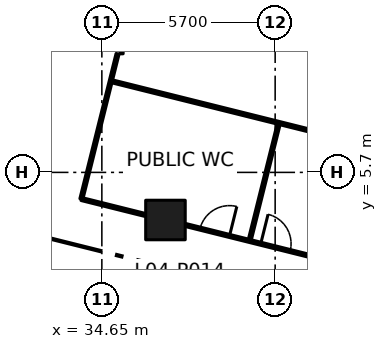
"""IFC4 building model, lengths in metres.
Left out: names, types, materials, properties, quantities, classifications, styles, units other than length and angle.
Written with IfcOpenShell. Run it as: python <this file> out.ifc"""

import sys

from ifc_helpers import new_model, si_unit, direction, frame, frame_2d, origin, origin_2d, place, context, subcontext, project, spatial, rectangle, extrude, element, fill, save


model = new_model("IFC4")
c1 = context("Model", 3, precision=1e-05, world=origin(), true_north=direction((0.0, 1.0)))
c2 = subcontext(c1, "Body", "Model", "MODEL_VIEW")
j1 = project(units=[si_unit("LENGTHUNIT", "METRE"), si_unit("PLANEANGLEUNIT", "RADIAN")], contexts=[c1])
p1 = place(None, origin())
s1 = spatial("IfcSite", under=j1, at=p1, CompositionType="ELEMENT")
p2 = place(p1, origin())
s2 = spatial("IfcBuilding", under=s1, at=p2, CompositionType="ELEMENT")
p3 = place(p2, frame((0.0, 0.0, 23.4)))
s3 = spatial("IfcBuildingStorey", under=s2, at=p3, CompositionType="ELEMENT", Elevation=23.4)
p4 = place(p3, frame((36.742, 4.134, 0.0), z_axis=(0.0, 0.0, 1.0), x_axis=(1.0, 0.0, 0.0)))
e1 = element("IfcColumn", 1, at=p4, inside=s3, PredefinedType="COLUMN", context=c2, shape_type="SweptSolid", body=[
    extrude(rectangle(XDim=1.3, YDim=1.3, at=origin_2d()), origin(), (0.0, 0.0, 1.0), 4.8),
])
p5 = place(p3, frame((33.976, 4.824, 0.0), z_axis=(0.0, 0.0, 1.0), x_axis=(0.241940400058, 0.970291112409, 0.0)))
e2 = element("IfcWall", 2, at=p5, inside=s3, PredefinedType="PARTITIONING", context=c2, shape_type="SweptSolid", body=[
    extrude(rectangle(XDim=4.922, YDim=0.1, at=frame_2d((2.461, 0.0))), origin(), (0.0, 0.0, 1.0), 4.35),
])
p6 = place(p3, frame((35.3, 9.6, 0.0), z_axis=(0.0, 0.0, 1.0), x_axis=(0.0, 1.0, 0.0)))
e3 = element("IfcWall", 3, at=p6, inside=s3, PredefinedType="PARTITIONING", context=c2, shape_type="SweptSolid", body=[
    extrude(rectangle(XDim=12.675, YDim=0.1, at=frame_2d((6.337, 0.0))), origin(), (0.0, 0.0, 1.0), 4.35),
])
p7 = place(p6, frame((7.98, 0.0, 0.0)))
e4 = element("IfcOpeningElement", 4, at=p7, cuts=e3, PredefinedType="OPENING", context=c2, shape_type="SweptSolid", body=[
    extrude(rectangle(XDim=1.0, YDim=2.1, at=frame_2d((0.5, 1.05))), frame((0.0, 0.06, 0.0), z_axis=(0.0, -1.0, 0.0), x_axis=(1.0, 0.0, 0.0)), (0.0, 0.0, 1.0), 0.12),
])
p8 = place(p3, frame((36.072, 4.301, 0.0), z_axis=(0.0, 0.0, 1.0), x_axis=(-0.970255412337, 0.242083528623, 0.0)))
e5 = element("IfcWall", 5, at=p8, inside=s3, PredefinedType="PARTITIONING", context=c2, shape_type="SweptSolid", body=[
    extrude(rectangle(XDim=2.16, YDim=0.1, at=frame_2d((1.08, 0.0))), origin(), (0.0, 0.0, 1.0), 4.35),
])
p9 = place(p3, frame((37.412, 3.967, 0.0), z_axis=(0.0, 0.0, 1.0), x_axis=(0.970335093604, -0.241763947107, 0.0)))
e6 = element("IfcWall", 6, at=p9, inside=s3, PredefinedType="PARTITIONING", context=c2, shape_type="SweptSolid", body=[
    extrude(rectangle(XDim=4.318, YDim=0.1, at=frame_2d((2.159, 0.0))), origin(), (0.0, 0.0, 1.0), 4.35),
])
p10 = place(p9, frame((0.48, 0.0, 0.0)))
e7 = element("IfcOpeningElement", 7, at=p10, cuts=e6, PredefinedType="OPENING", context=c2, shape_type="SweptSolid", body=[
    extrude(rectangle(XDim=1.0, YDim=2.1, at=frame_2d((0.5, 1.05))), frame((0.0, 0.06, 0.0), z_axis=(0.0, -1.0, 0.0), x_axis=(1.0, 0.0, 0.0)), (0.0, 0.0, 1.0), 0.12),
])
p11 = place(p9, frame((2.539, 0.0, 0.0)))
e8 = element("IfcOpeningElement", 8, at=p11, cuts=e6, PredefinedType="OPENING", context=c2, shape_type="SweptSolid", body=[
    extrude(rectangle(XDim=1.0, YDim=2.1, at=frame_2d((0.5, 1.05))), frame((0.0, 0.06, 0.0), z_axis=(0.0, -1.0, 0.0), x_axis=(1.0, 0.0, 0.0)), (0.0, 0.0, 1.0), 0.12),
])
p12 = place(p3, frame((34.993, 8.693, 0.0), z_axis=(0.0, 0.0, 1.0), x_axis=(0.97029161727, -0.241938375328, 0.0)))
e9 = element("IfcWall", 9, at=p12, inside=s3, PredefinedType="PARTITIONING", context=c2, shape_type="SweptSolid", body=[
    extrude(rectangle(XDim=11.35, YDim=0.1, at=frame_2d((5.675, 0.0))), origin(), (0.0, 0.0, 1.0), 4.35),
])
p13 = place(p3, frame((39.519, 3.494, 0.0), z_axis=(0.0, 0.0, 1.0), x_axis=(0.242064152871, 0.970260246478, 0.0)))
e10 = element("IfcWall", 10, at=p13, inside=s3, PredefinedType="PARTITIONING", context=c2, shape_type="SweptSolid", body=[
    extrude(rectangle(XDim=3.899, YDim=0.1, at=frame_2d((1.95, 0.0))), origin(), (0.0, 0.0, 1.0), 4.35),
])
p14 = place(p10, origin())
e11 = element("IfcDoor", 11, at=p14, inside=s3, OperationType="SINGLE_SWING_RIGHT", PredefinedType="DOOR", context=c2, shape_type="SweptSolid", body=[
    extrude(rectangle(XDim=1.0, YDim=2.1, at=frame_2d((0.5, 1.05))), frame((0.0, 0.025, 0.0), z_axis=(0.0, -1.0, 0.0), x_axis=(1.0, 0.0, 0.0)), (0.0, 0.0, 1.0), 0.05),
])
fill(e7, e11)
p15 = place(p11, origin())
e12 = element("IfcDoor", 12, at=p15, inside=s3, OperationType="SINGLE_SWING_LEFT", PredefinedType="DOOR", context=c2, shape_type="SweptSolid", body=[
    extrude(rectangle(XDim=1.0, YDim=2.1, at=frame_2d((0.5, 1.05))), frame((0.0, 0.025, 0.0), z_axis=(0.0, -1.0, 0.0), x_axis=(1.0, 0.0, 0.0)), (0.0, 0.0, 1.0), 0.05),
])
fill(e8, e12)
save(model, sys.argv[1])
